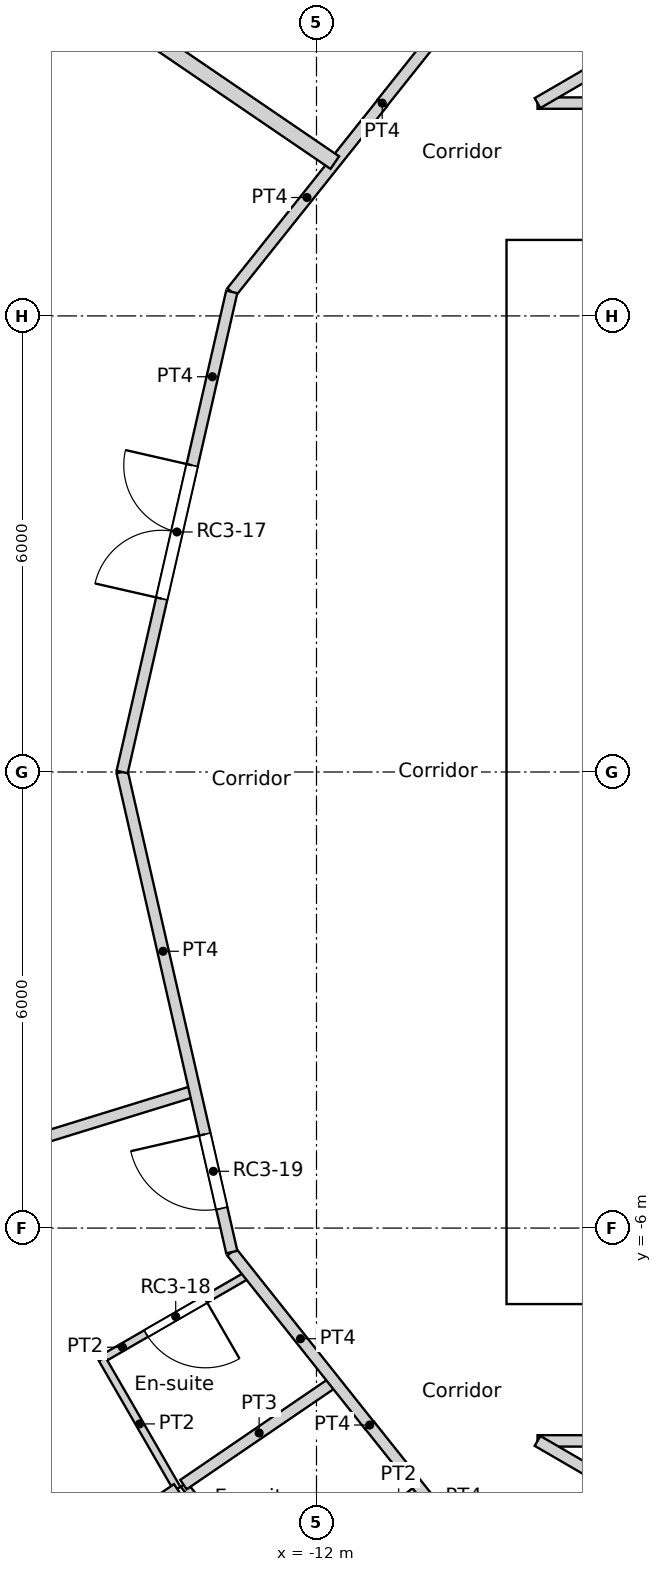
"""IFC4 building model, lengths in metres.
Left out: names, types, materials, properties, quantities, classifications, styles, units other than length and angle.
Written with IfcOpenShell. Run it as: python <this file> out.ifc"""

import sys

from ifc_helpers import new_model, si_unit, direction, frame, frame_2d, origin, place, context, subcontext, project, spatial, rectangle, extrude, element, fill, save


model = new_model("IFC4")
c1 = context("Model", 3, precision=1e-05, world=origin(), true_north=direction((0.0, 1.0)))
c2 = subcontext(c1, "Body", "Model", "MODEL_VIEW")
j1 = project(units=[si_unit("LENGTHUNIT", "METRE"), si_unit("PLANEANGLEUNIT", "RADIAN")], contexts=[c1])
p1 = place(None, origin())
s1 = spatial("IfcSite", under=j1, at=p1, CompositionType="ELEMENT")
p2 = place(p1, origin())
s2 = spatial("IfcBuilding", under=s1, at=p2, CompositionType="ELEMENT")
p3 = place(p2, frame((0.0, 0.0, 252.6)))
s3 = spatial("IfcBuildingStorey", under=s2, at=p3, CompositionType="ELEMENT", Elevation=252.6)
p4 = place(p3, frame((-9.5, -6.7, 0.0), z_axis=(0.0, 0.0, 1.0), x_axis=(1.0, 0.0, 0.0)))
e1 = element("IfcWall", 1, at=p4, inside=s3, PredefinedType="SOLIDWALL", context=c2, shape_type="SweptSolid", body=[
    extrude(rectangle(XDim=19.0, YDim=0.6, at=frame_2d((9.5, 0.0))), origin(), (0.0, 0.0, 1.0), 3.6),
])
p5 = place(p4, frame((10.4, 0.0, 0.0)))
e2 = element("IfcOpeningElement", 2, at=p5, cuts=e1, PredefinedType="OPENING", context=c2, shape_type="SweptSolid", body=[
    extrude(rectangle(XDim=1.0, YDim=2.1, at=frame_2d((0.5, 1.05))), frame((0.0, 0.3, 0.0), z_axis=(0.0, -1.0, 0.0), x_axis=(1.0, 0.0, 0.0)), (0.0, 0.0, 1.0), 0.6),
])
p6 = place(p4, frame((5.35, 0.0, 0.0)))
e3 = element("IfcOpeningElement", 3, at=p6, cuts=e1, PredefinedType="OPENING", context=c2, shape_type="SweptSolid", body=[
    extrude(rectangle(XDim=1.7, YDim=2.1, at=frame_2d((0.85, 1.05))), frame((0.0, 0.3, 0.0), z_axis=(0.0, -1.0, 0.0), x_axis=(1.0, 0.0, 0.0)), (0.0, 0.0, 1.0), 0.6),
])
p7 = place(p4, frame((11.95, 0.0, 0.0)))
e4 = element("IfcOpeningElement", 4, at=p7, cuts=e1, PredefinedType="OPENING", context=c2, shape_type="SweptSolid", body=[
    extrude(rectangle(XDim=1.7, YDim=2.1, at=frame_2d((0.85, 1.05))), frame((0.0, 0.3, 0.0), z_axis=(0.0, -1.0, 0.0), x_axis=(1.0, 0.0, 0.0)), (0.0, 0.0, 1.0), 0.6),
])
p8 = place(p3, frame((-9.5, 6.7, 0.0), z_axis=(0.0, 0.0, 1.0), x_axis=(1.0, 0.0, 0.0)))
e5 = element("IfcWall", 5, at=p8, inside=s3, PredefinedType="SOLIDWALL", context=c2, shape_type="SweptSolid", body=[
    extrude(rectangle(XDim=19.0, YDim=0.6, at=frame_2d((9.5, 0.0))), origin(), (0.0, 0.0, 1.0), 3.6),
])
p9 = place(p8, frame((5.35, 0.0, 0.0)))
e6 = element("IfcOpeningElement", 6, at=p9, cuts=e5, PredefinedType="OPENING", context=c2, shape_type="SweptSolid", body=[
    extrude(rectangle(XDim=1.7, YDim=2.1, at=frame_2d((0.85, 1.05))), frame((0.0, 0.3, 0.0), z_axis=(0.0, -1.0, 0.0), x_axis=(1.0, 0.0, 0.0)), (0.0, 0.0, 1.0), 0.6),
])
p10 = place(p3, frame((-9.2, -6.4, 0.0), z_axis=(0.0, 0.0, 1.0), x_axis=(0.0, 1.0, 0.0)))
e7 = element("IfcWall", 7, at=p10, inside=s3, PredefinedType="SOLIDWALL", context=c2, shape_type="SweptSolid", body=[
    extrude(rectangle(XDim=12.8, YDim=0.6, at=frame_2d((6.4, 0.0))), origin(), (0.0, 0.0, 1.0), 3.6),
])
p11 = place(p3, frame((-8.9, -3.1, 0.0), z_axis=(0.0, 0.0, 1.0), x_axis=(1.0, 0.0, 0.0)))
e8 = element("IfcWall", 8, at=p11, inside=s3, PredefinedType="SOLIDWALL", context=c2, shape_type="SweptSolid", body=[
    extrude(rectangle(XDim=9.6, YDim=0.3, at=frame_2d((4.8, 0.0))), origin(), (0.0, 0.0, 1.0), 3.25),
])
p12 = place(p11, frame((4.75, 0.0, 0.0)))
e9 = element("IfcOpeningElement", 9, at=p12, cuts=e8, PredefinedType="OPENING", context=c2, shape_type="SweptSolid", body=[
    extrude(rectangle(XDim=1.7, YDim=2.1, at=frame_2d((0.85, 1.05))), frame((0.0, 0.15, 0.0), z_axis=(0.0, -1.0, 0.0), x_axis=(1.0, 0.0, 0.0)), (0.0, 0.0, 1.0), 0.3),
])
p13 = place(p3, frame((-8.9, 3.1, 0.0), z_axis=(0.0, 0.0, 1.0), x_axis=(1.0, 0.0, 0.0)))
e10 = element("IfcWall", 10, at=p13, inside=s3, PredefinedType="SOLIDWALL", context=c2, shape_type="SweptSolid", body=[
    extrude(rectangle(XDim=4.55, YDim=0.3, at=frame_2d((2.275, 0.0))), origin(), (0.0, 0.0, 1.0), 3.25),
])
p14 = place(p3, frame((-8.9, 0.0, 0.0), z_axis=(0.0, 0.0, 1.0), x_axis=(1.0, 0.0, 0.0)))
e11 = element("IfcWall", 11, at=p14, inside=s3, PredefinedType="SOLIDWALL", context=c2, shape_type="SweptSolid", body=[
    extrude(rectangle(XDim=3.0, YDim=0.3, at=frame_2d((1.5, 0.0))), origin(), (0.0, 0.0, 1.0), 3.25),
])
p15 = place(p3, frame((-9.092, 8.8, 0.0), z_axis=(0.0, 0.0, 1.0), x_axis=(0.864470922103, 0.502682827277, 0.0)))
e12 = element("IfcWall", 12, at=p15, inside=s3, PredefinedType="PARTITIONING", context=c2, shape_type="SweptSolid", body=[
    extrude(rectangle(XDim=6.735, YDim=0.15, at=frame_2d((3.368, 0.0))), origin(), (0.0, 0.0, 1.0), 3.25),
])
p16 = place(p3, frame((-9.092, 8.8, 0.0), z_axis=(0.0, 0.0, 1.0), x_axis=(1.0, 0.0, 0.0)))
e13 = element("IfcWall", 13, at=p16, inside=s3, PredefinedType="PARTITIONING", context=c2, shape_type="SweptSolid", body=[
    extrude(rectangle(XDim=8.196, YDim=0.15, at=frame_2d((4.098, 0.0))), origin(), (0.0, 0.0, 1.0), 3.25),
])
p17 = place(p16, frame((3.598, 0.0, 0.0)))
e14 = element("IfcOpeningElement", 14, at=p17, cuts=e13, PredefinedType="OPENING", context=c2, shape_type="SweptSolid", body=[
    extrude(rectangle(XDim=1.0, YDim=2.04, at=frame_2d((0.5, 1.02))), frame((0.0, 0.075, 0.0), z_axis=(0.0, -1.0, 0.0), x_axis=(1.0, 0.0, 0.0)), (0.0, 0.0, 1.0), 0.15),
])
p18 = place(p3, frame((-11.134, 8.8, 0.0), z_axis=(0.0, 0.0, 1.0), x_axis=(-1.0, 0.0, 0.0)))
e15 = element("IfcWall", 15, at=p18, inside=s3, PredefinedType="PARTITIONING", context=c2, shape_type="SweptSolid", body=[
    extrude(rectangle(XDim=0.003, YDim=0.15, at=frame_2d((0.001, 0.0))), origin(), (0.0, 0.0, 1.0), 3.25),
])
p19 = place(p3, frame((-11.136, 8.802, 0.0), z_axis=(0.0, 0.0, 1.0), x_axis=(0.623151397235, 0.782101231379, 0.0)))
e16 = element("IfcWall", 16, at=p19, inside=s3, PredefinedType="PARTITIONING", context=c2, shape_type="SweptSolid", body=[
    extrude(rectangle(XDim=3.301, YDim=0.15, at=frame_2d((1.65, 0.0))), origin(), (0.0, 0.0, 1.0), 3.25),
])
p20 = place(p3, frame((-9.092, -8.8, 0.0), z_axis=(0.0, 0.0, 1.0), x_axis=(1.0, 0.0, 0.0)))
e17 = element("IfcWall", 17, at=p20, inside=s3, PredefinedType="PARTITIONING", context=c2, shape_type="SweptSolid", body=[
    extrude(rectangle(XDim=8.196, YDim=0.15, at=frame_2d((4.098, 0.0))), origin(), (0.0, 0.0, 1.0), 3.25),
])
p21 = place(p20, frame((3.598, 0.0, 0.0)))
e18 = element("IfcOpeningElement", 18, at=p21, cuts=e17, PredefinedType="OPENING", context=c2, shape_type="SweptSolid", body=[
    extrude(rectangle(XDim=1.0, YDim=2.04, at=frame_2d((0.5, 1.02))), frame((0.0, 0.075, 0.0), z_axis=(0.0, -1.0, 0.0), x_axis=(1.0, 0.0, 0.0)), (0.0, 0.0, 1.0), 0.15),
])
p22 = place(p3, frame((-9.092, -8.8, 0.0), z_axis=(0.0, 0.0, 1.0), x_axis=(0.864470922103, -0.502682827277, 0.0)))
e19 = element("IfcWall", 19, at=p22, inside=s3, PredefinedType="PARTITIONING", context=c2, shape_type="SweptSolid", body=[
    extrude(rectangle(XDim=6.735, YDim=0.15, at=frame_2d((3.368, 0.0))), origin(), (0.0, 0.0, 1.0), 3.25),
])
p23 = place(p3, frame((-11.3, -8.596, 0.0), z_axis=(0.0, 0.0, 1.0), x_axis=(0.623165080354, -0.782090328944, 0.0)))
e20 = element("IfcWall", 20, at=p23, inside=s3, PredefinedType="PARTITIONING", context=c2, shape_type="SweptSolid", body=[
    extrude(rectangle(XDim=3.564, YDim=0.15, at=frame_2d((1.782, 0.0))), origin(), (0.0, 0.0, 1.0), 3.25),
])
p24 = place(p23, frame((2.244, 0.0, 0.0)))
e21 = element("IfcOpeningElement", 21, at=p24, cuts=e20, PredefinedType="OPENING", context=c2, shape_type="SweptSolid", body=[
    extrude(rectangle(XDim=1.0, YDim=2.1, at=frame_2d((0.5, 1.05))), frame((0.0, 0.075, 0.0), z_axis=(0.0, -1.0, 0.0), x_axis=(1.0, 0.0, 0.0)), (0.0, 0.0, 1.0), 0.15),
])
p25 = place(p3, frame((-11.3, -8.596, 0.0), z_axis=(0.0, 0.0, 1.0), x_axis=(0.0, 1.0, 0.0)))
e22 = element("IfcWall", 22, at=p25, inside=s3, PredefinedType="PARTITIONING", context=c2, shape_type="SweptSolid", body=[
    extrude(rectangle(XDim=0.01, YDim=0.15, at=frame_2d((0.005, 0.0))), origin(), (0.0, 0.0, 1.0), 3.25),
])
p26 = place(p3, frame((-13.115, 6.316, 0.0), z_axis=(0.0, 0.0, 1.0), x_axis=(0.623560523309, 0.781775078761, 0.0)))
e23 = element("IfcWall", 23, at=p26, inside=s3, PredefinedType="PARTITIONING", context=c2, shape_type="SweptSolid", body=[
    extrude(rectangle(XDim=3.177, YDim=0.15, at=frame_2d((1.589, 0.0))), origin(), (0.0, 0.0, 1.0), 3.25),
])
p27 = place(p3, frame((-14.557, 0.0, 0.0), z_axis=(0.0, 0.0, 1.0), x_axis=(0.22264061368, -0.974900588337, 0.0)))
e24 = element("IfcWall", 24, at=p27, inside=s3, PredefinedType="PARTITIONING", context=c2, shape_type="SweptSolid", body=[
    extrude(rectangle(XDim=6.479, YDim=0.15, at=frame_2d((3.239, 0.0))), origin(), (0.0, 0.0, 1.0), 3.25),
])
p28 = place(p27, frame((4.888, 0.0, 0.0)))
e25 = element("IfcOpeningElement", 25, at=p28, cuts=e24, PredefinedType="OPENING", context=c2, shape_type="SweptSolid", body=[
    extrude(rectangle(XDim=1.0, YDim=2.1, at=frame_2d((0.5, 1.05))), frame((0.0, 0.075, 0.0), z_axis=(0.0, -1.0, 0.0), x_axis=(1.0, 0.0, 0.0)), (0.0, 0.0, 1.0), 0.15),
])
p29 = place(p3, frame((-14.557, 0.0, 0.0), z_axis=(0.0, 0.0, 1.0), x_axis=(0.222568978642, 0.97491694505, 0.0)))
e26 = element("IfcWall", 26, at=p29, inside=s3, PredefinedType="PARTITIONING", context=c2, shape_type="SweptSolid", body=[
    extrude(rectangle(XDim=6.479, YDim=0.15, at=frame_2d((3.239, 0.0))), origin(), (0.0, 0.0, 1.0), 3.25),
])
p30 = place(p29, frame((2.339, 0.0, 0.0)))
e27 = element("IfcOpeningElement", 27, at=p30, cuts=e26, PredefinedType="OPENING", context=c2, shape_type="SweptSolid", body=[
    extrude(rectangle(XDim=1.8, YDim=2.1, at=frame_2d((0.9, 1.05))), frame((0.0, 0.075, 0.0), z_axis=(0.0, -1.0, 0.0), x_axis=(1.0, 0.0, 0.0)), (0.0, 0.0, 1.0), 0.15),
])
p31 = place(p3, frame((-13.115, -6.316, 0.0), z_axis=(0.0, 0.0, 1.0), x_axis=(0.622042479172, -0.782983495423, 0.0)))
e28 = element("IfcWall", 28, at=p31, inside=s3, PredefinedType="PARTITIONING", context=c2, shape_type="SweptSolid", body=[
    extrude(rectangle(XDim=2.911, YDim=0.15, at=frame_2d((1.456, 0.0))), origin(), (0.0, 0.0, 1.0), 3.25),
])
p32 = place(p3, frame((-16.336, 11.138, 0.0), z_axis=(0.0, 0.0, 1.0), x_axis=(0.826207761897, -0.563365542238, 0.0)))
e29 = element("IfcWall", 29, at=p32, inside=s3, PredefinedType="PARTITIONING", context=c2, shape_type="SweptSolid", body=[
    extrude(rectangle(XDim=5.54, YDim=0.2, at=frame_2d((2.77, 0.0))), origin(), (0.0, 0.0, 1.0), 3.25),
])
p33 = place(p3, frame((-18.893, -5.828, 0.0), z_axis=(0.0, 0.0, 1.0), x_axis=(0.955580602693, 0.294729896274, 0.0)))
e30 = element("IfcWall", 30, at=p33, inside=s3, PredefinedType="PARTITIONING", context=c2, shape_type="SweptSolid", body=[
    extrude(rectangle(XDim=5.54, YDim=0.15, at=frame_2d((2.77, 0.0))), origin(), (0.0, 0.0, 1.0), 3.25),
])
p34 = place(p3, frame((-14.82, -7.722, 0.0), z_axis=(0.0, 0.0, 1.0), x_axis=(0.866076416361, 0.499911633214, 0.0)))
e31 = element("IfcWall", 31, at=p34, inside=s3, PredefinedType="PARTITIONING", context=c2, shape_type="SweptSolid", body=[
    extrude(rectangle(XDim=2.234, YDim=0.1, at=frame_2d((1.117, 0.0))), origin(), (0.0, 0.0, 1.0), 3.25),
])
p35 = place(p34, frame((0.667, 0.0, 0.0)))
e32 = element("IfcOpeningElement", 32, at=p35, cuts=e31, PredefinedType="OPENING", context=c2, shape_type="SweptSolid", body=[
    extrude(rectangle(XDim=0.9, YDim=2.04, at=frame_2d((0.45, 1.02))), frame((0.0, 0.05, 0.0), z_axis=(0.0, -1.0, 0.0), x_axis=(1.0, 0.0, 0.0)), (0.0, 0.0, 1.0), 0.1),
])
p36 = place(p3, frame((-14.82, -7.722, 0.0), z_axis=(0.0, 0.0, 1.0), x_axis=(0.500143626598, -0.865942465048, 0.0)))
e33 = element("IfcWall", 33, at=p36, inside=s3, PredefinedType="PARTITIONING", context=c2, shape_type="SweptSolid", body=[
    extrude(rectangle(XDim=1.974, YDim=0.1, at=frame_2d((0.987, 0.0))), origin(), (0.0, 0.0, 1.0), 3.25),
])
p37 = place(p3, frame((-16.336, -11.138, 0.0), z_axis=(0.0, 0.0, 1.0), x_axis=(0.826152320289, 0.56344684193, 0.0)))
e34 = element("IfcWall", 34, at=p37, inside=s3, PredefinedType="PARTITIONING", context=c2, shape_type="SweptSolid", body=[
    extrude(rectangle(XDim=3.03, YDim=0.15, at=frame_2d((1.515, 0.0))), origin(), (0.0, 0.0, 1.0), 3.25),
])
p38 = place(p3, frame((-13.75, -9.375, 0.0), z_axis=(0.0, 0.0, 1.0), x_axis=(0.826143746222, 0.563459413426, 0.0)))
e35 = element("IfcWall", 35, at=p38, inside=s3, PredefinedType="PARTITIONING", context=c2, shape_type="SweptSolid", body=[
    extrude(rectangle(XDim=2.41, YDim=0.15, at=frame_2d((1.205, 0.0))), origin(), (0.0, 0.0, 1.0), 3.25),
])
p39 = place(p3, frame((-13.747, -9.373, 0.0), z_axis=(0.0, 0.0, 1.0), x_axis=(0.623330716607, -0.781958322249, 0.0)))
e36 = element("IfcWall", 36, at=p39, inside=s3, PredefinedType="PARTITIONING", context=c2, shape_type="SweptSolid", body=[
    extrude(rectangle(XDim=1.965, YDim=0.1, at=frame_2d((0.983, 0.0))), origin(), (0.0, 0.0, 1.0), 3.25),
])
p40 = place(p3, frame((-12.522, -10.91, 0.0), z_axis=(0.0, 0.0, 1.0), x_axis=(0.781830263661, 0.623491330191, 0.0)))
e37 = element("IfcWall", 37, at=p40, inside=s3, PredefinedType="PARTITIONING", context=c2, shape_type="SweptSolid", body=[
    extrude(rectangle(XDim=2.401, YDim=0.1, at=frame_2d((1.2, 0.0))), origin(), (0.0, 0.0, 1.0), 3.25),
])
p41 = place(p40, frame((0.75, 0.0, 0.0)))
e38 = element("IfcOpeningElement", 38, at=p41, cuts=e37, PredefinedType="OPENING", context=c2, shape_type="SweptSolid", body=[
    extrude(rectangle(XDim=0.9, YDim=2.04, at=frame_2d((0.45, 1.02))), frame((0.0, 0.05, 0.0), z_axis=(0.0, -1.0, 0.0), x_axis=(1.0, 0.0, 0.0)), (0.0, 0.0, 1.0), 0.1),
])
p42 = place(p30, origin())
e39 = element("IfcDoor", 39, at=p42, inside=s3, OperationType="DOUBLE_DOOR_SINGLE_SWING", PredefinedType="DOOR", context=c2, shape_type="SweptSolid", body=[
    extrude(rectangle(XDim=1.8, YDim=2.1, at=frame_2d((0.9, 1.05))), frame((0.0, 0.025, 0.0), z_axis=(0.0, -1.0, 0.0), x_axis=(1.0, 0.0, 0.0)), (0.0, 0.0, 1.0), 0.05),
])
fill(e27, e39)
p43 = place(p35, origin())
e40 = element("IfcDoor", 40, at=p43, inside=s3, OperationType="SINGLE_SWING_LEFT", PredefinedType="DOOR", context=c2, shape_type="SweptSolid", body=[
    extrude(rectangle(XDim=0.9, YDim=2.04, at=frame_2d((0.45, 1.02))), frame((0.0, 0.025, 0.0), z_axis=(0.0, -1.0, 0.0), x_axis=(1.0, 0.0, 0.0)), (0.0, 0.0, 1.0), 0.05),
])
fill(e32, e40)
p44 = place(p28, origin())
e41 = element("IfcDoor", 41, at=p44, inside=s3, OperationType="SINGLE_SWING_RIGHT", PredefinedType="DOOR", context=c2, shape_type="SweptSolid", body=[
    extrude(rectangle(XDim=1.0, YDim=2.1, at=frame_2d((0.5, 1.05))), frame((0.0, 0.025, 0.0), z_axis=(0.0, -1.0, 0.0), x_axis=(1.0, 0.0, 0.0)), (0.0, 0.0, 1.0), 0.05),
])
fill(e25, e41)
save(model, sys.argv[1])
